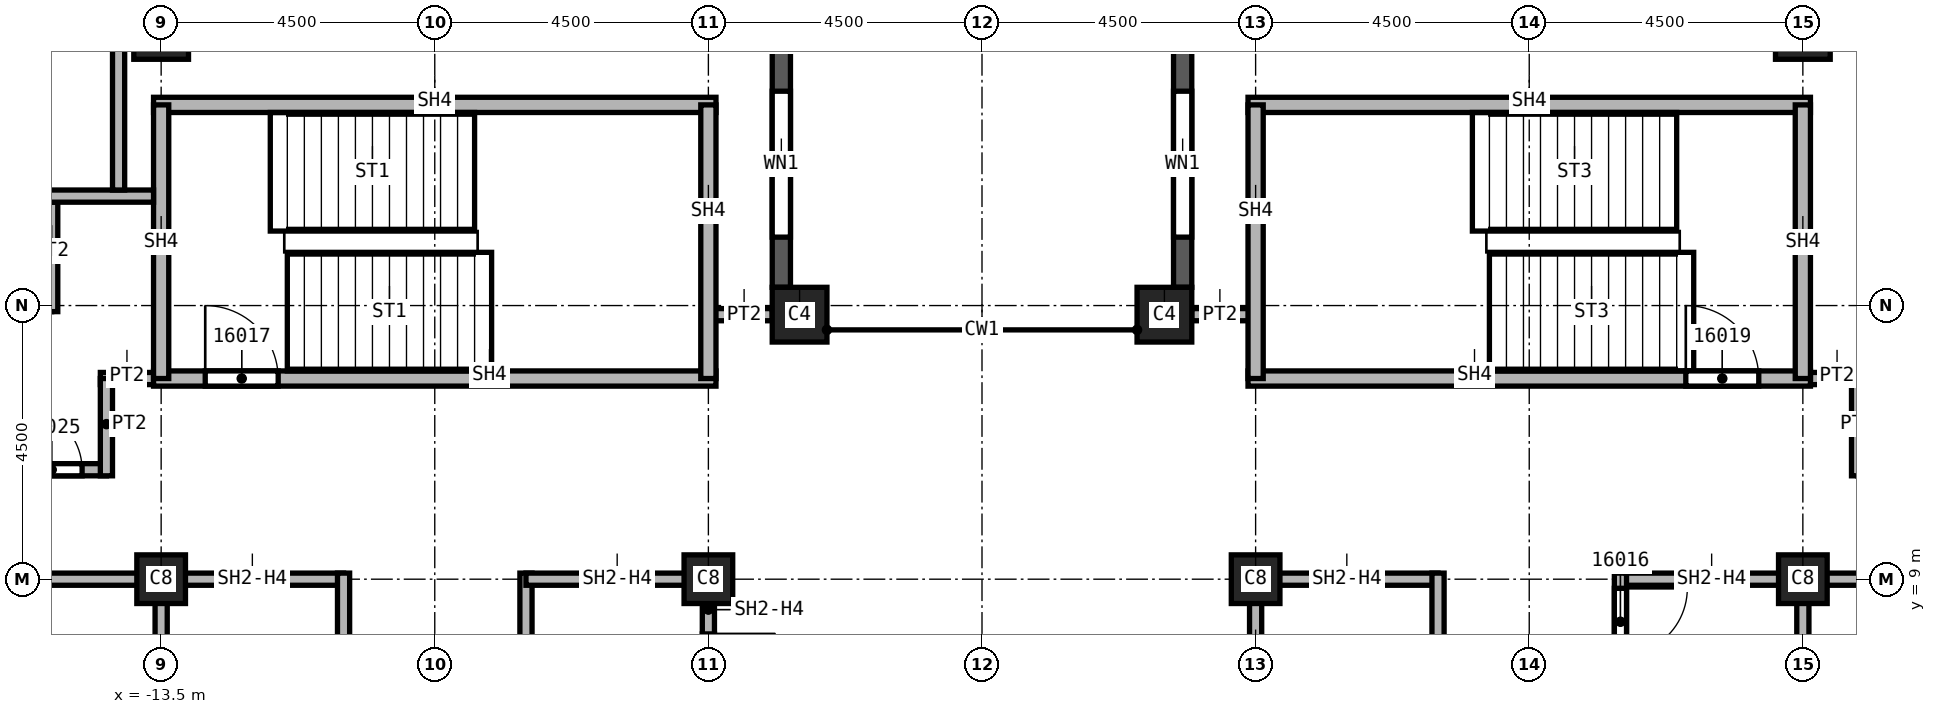
"""IFC4 building model, lengths in metres.
Left out: names, types, materials, properties, quantities, classifications, styles, units other than length and angle.
Written with IfcOpenShell. Run it as: python <this file> out.ifc"""

import sys

from ifc_helpers import new_model, si_unit, direction, frame, frame_2d, origin, origin_2d, place, context, subcontext, project, spatial, rectangle, extrude, element, fill, save


model = new_model("IFC4")
c1 = context("Model", 3, precision=1e-05, world=origin(), true_north=direction((0.0, 1.0)))
c2 = subcontext(c1, "Body", "Model", "MODEL_VIEW")
j1 = project(units=[si_unit("LENGTHUNIT", "METRE"), si_unit("PLANEANGLEUNIT", "RADIAN")], contexts=[c1])
p1 = place(None, origin())
s1 = spatial("IfcSite", under=j1, at=p1, CompositionType="ELEMENT")
p2 = place(p1, origin())
s2 = spatial("IfcBuilding", under=s1, at=p2, CompositionType="ELEMENT")
p3 = place(p2, frame((0.0, 0.0, 246.0)))
s3 = spatial("IfcBuildingStorey", under=s2, at=p3, CompositionType="ELEMENT", Elevation=246.0)
for number, where, z_axis, x_axis in (
    (1, (13.5, 18.0, 0.0), (0.0, 0.0, 1.0), (1.0, 0.0, 0.0)),
    (2, (-13.5, 18.0, 0.0), (0.0, 0.0, 1.0), (1.0, 0.0, 0.0)),
):
    element("IfcColumn", number, at=place(p3, frame(where, z_axis=z_axis, x_axis=x_axis)), inside=s3, PredefinedType="COLUMN", context=c2, shape_type="SweptSolid", body=[
        extrude(rectangle(XDim=0.9, YDim=0.9, at=origin_2d()), origin(), (0.0, 0.0, 1.0), 3.72),
    ])
for number, where, z_axis, x_axis in (
    (3, (4.5, 9.0, 0.0), (0.0, 0.0, 1.0), (1.0, 0.0, 0.0)),
    (4, (13.5, 9.0, 0.0), (0.0, 0.0, 1.0), (1.0, 0.0, 0.0)),
    (5, (-4.5, 9.0, 0.0), (0.0, 0.0, 1.0), (1.0, 0.0, 0.0)),
    (6, (-13.5, 9.0, 0.0), (0.0, 0.0, 1.0), (1.0, 0.0, 0.0)),
):
    element("IfcColumn", number, at=place(p3, frame(where, z_axis=z_axis, x_axis=x_axis)), inside=s3, PredefinedType="COLUMN", context=c2, shape_type="SweptSolid", body=[
        extrude(rectangle(XDim=0.8, YDim=0.8, at=origin_2d()), origin(), (0.0, 0.0, 1.0), 3.72),
    ])
for number, where, z_axis, x_axis in (
    (7, (3.0, 13.35, 0.0), (0.0, 0.0, 1.0), (1.0, 0.0, 0.0)),
    (8, (-3.0, 13.35, 0.0), (0.0, 0.0, 1.0), (1.0, 0.0, 0.0)),
):
    element("IfcColumn", number, at=place(p3, frame(where, z_axis=z_axis, x_axis=x_axis)), inside=s3, PredefinedType="COLUMN", context=c2, shape_type="SweptSolid", body=[
        extrude(rectangle(XDim=0.9, YDim=0.9, at=origin_2d()), origin(), (0.0, 0.0, 1.0), 3.72),
    ])
p4 = place(p3, frame((3.3, 21.9, 0.0), z_axis=(0.0, 0.0, 1.0), x_axis=(0.0, -1.0, 0.0)))
e9 = element("IfcWall", 9, at=p4, inside=s3, PredefinedType="SOLIDWALL", context=c2, shape_type="SweptSolid", body=[
    extrude(rectangle(XDim=8.1, YDim=0.3, at=frame_2d((4.05, 0.0))), origin(), (0.0, 0.0, 1.0), 3.12),
])
p5 = place(p4, frame((0.825, 0.0, 0.8)))
e10 = element("IfcOpeningElement", 10, at=p5, cuts=e9, PredefinedType="OPENING", context=c2, shape_type="SweptSolid", body=[
    extrude(rectangle(XDim=2.4, YDim=1.95, at=frame_2d((1.2, 0.975))), frame((0.0, 0.15, 0.0), z_axis=(0.0, -1.0, 0.0), x_axis=(1.0, 0.0, 0.0)), (0.0, 0.0, 1.0), 0.3),
])
p6 = place(p4, frame((4.875, 0.0, 0.8)))
e11 = element("IfcOpeningElement", 11, at=p6, cuts=e9, PredefinedType="OPENING", context=c2, shape_type="SweptSolid", body=[
    extrude(rectangle(XDim=2.4, YDim=1.95, at=frame_2d((1.2, 0.975))), frame((0.0, 0.15, 0.0), z_axis=(0.0, -1.0, 0.0), x_axis=(1.0, 0.0, 0.0)), (0.0, 0.0, 1.0), 0.3),
])
p7 = place(p3, frame((-3.3, 13.8, 0.0), z_axis=(0.0, 0.0, 1.0), x_axis=(0.0, 1.0, 0.0)))
e12 = element("IfcWall", 12, at=p7, inside=s3, PredefinedType="SOLIDWALL", context=c2, shape_type="SweptSolid", body=[
    extrude(rectangle(XDim=8.1, YDim=0.3, at=frame_2d((4.05, 0.0))), origin(), (0.0, 0.0, 1.0), 3.12),
])
p8 = place(p7, frame((0.825, 0.0, 0.8)))
e13 = element("IfcOpeningElement", 13, at=p8, cuts=e12, PredefinedType="OPENING", context=c2, shape_type="SweptSolid", body=[
    extrude(rectangle(XDim=2.4, YDim=1.95, at=frame_2d((1.2, 0.975))), frame((0.0, 0.15, 0.0), z_axis=(0.0, -1.0, 0.0), x_axis=(1.0, 0.0, 0.0)), (0.0, 0.0, 1.0), 0.3),
])
p9 = place(p7, frame((4.875, 0.0, 0.8)))
e14 = element("IfcOpeningElement", 14, at=p9, cuts=e12, PredefinedType="OPENING", context=c2, shape_type="SweptSolid", body=[
    extrude(rectangle(XDim=2.4, YDim=1.95, at=frame_2d((1.2, 0.975))), frame((0.0, 0.15, 0.0), z_axis=(0.0, -1.0, 0.0), x_axis=(1.0, 0.0, 0.0)), (0.0, 0.0, 1.0), 0.3),
])
p10 = place(p3, frame((-18.0, 10.8, 0.0), z_axis=(0.0, 0.0, 1.0), x_axis=(1.0, 0.0, 0.0)))
e15 = element("IfcWall", 15, at=p10, inside=s3, PredefinedType="PARTITIONING", context=c2, shape_type="SweptSolid", body=[
    extrude(rectangle(XDim=3.6, YDim=0.2, at=frame_2d((1.8, 0.0))), origin(), (0.0, 0.0, 1.0), 3.72),
])
p11 = place(p10, frame((2.2, 0.0, 0.0)))
e16 = element("IfcOpeningElement", 16, at=p11, cuts=e15, PredefinedType="OPENING", context=c2, shape_type="SweptSolid", body=[
    extrude(rectangle(XDim=1.0, YDim=2.1, at=frame_2d((0.5, 1.05))), frame((0.0, 0.1, 0.0), z_axis=(0.0, -1.0, 0.0), x_axis=(1.0, 0.0, 0.0)), (0.0, 0.0, 1.0), 0.2),
])
p12 = place(p3, frame((-15.3, 15.2, 0.0), z_axis=(0.0, 0.0, 1.0), x_axis=(0.0, -1.0, 0.0)))
e17 = element("IfcWall", 17, at=p12, inside=s3, PredefinedType="PARTITIONING", context=c2, shape_type="SweptSolid", body=[
    extrude(rectangle(XDim=1.8, YDim=0.2, at=frame_2d((0.9, 0.0))), origin(), (0.0, 0.0, 1.0), 3.72),
])
p13 = place(p3, frame((-14.5, 12.3, 0.0), z_axis=(0.0, 0.0, 1.0), x_axis=(1.0, 0.0, 0.0)))
e18 = element("IfcWall", 18, at=p13, inside=s3, PredefinedType="PARTITIONING", context=c2, shape_type="SweptSolid", body=[
    extrude(rectangle(XDim=1.125, YDim=0.2, at=frame_2d((0.562, 0.0))), origin(), (0.0, 0.0, 1.0), 3.72),
])
p14 = place(p3, frame((-13.5, 9.0, 0.0), z_axis=(0.0, 0.0, 1.0), x_axis=(-1.0, 0.0, 0.0)))
e19 = element("IfcWall", 19, at=p14, inside=s3, PredefinedType="PARTITIONING", context=c2, shape_type="SweptSolid", body=[
    extrude(rectangle(XDim=4.5, YDim=0.2, at=frame_2d((2.25, 0.0))), origin(), (0.0, 0.0, 1.0), 3.72),
])
p15 = place(p3, frame((-14.4, 10.7, 0.0), z_axis=(0.0, 0.0, 1.0), x_axis=(0.0, 1.0, 0.0)))
e20 = element("IfcWall", 20, at=p15, inside=s3, PredefinedType="PARTITIONING", context=c2, shape_type="SweptSolid", body=[
    extrude(rectangle(XDim=1.6, YDim=0.2, at=frame_2d((0.8, 0.0))), origin(), (0.0, 0.0, 1.0), 3.72),
])
for number, where, z_axis, x_axis in (
    (21, (-4.5, 13.35, 0.0), (0.0, 0.0, 1.0), (1.0, 0.0, 0.0)),
    (22, (3.45, 13.35, 0.0), (0.0, 0.0, 1.0), (1.0, 0.0, 0.0)),
):
    element("IfcWall", number, at=place(p3, frame(where, z_axis=z_axis, x_axis=x_axis)), inside=s3, PredefinedType="PARTITIONING", context=c2, shape_type="SweptSolid", body=[
        extrude(rectangle(XDim=1.05, YDim=0.2, at=frame_2d((0.525, 0.0))), origin(), (0.0, 0.0, 1.0), 3.72),
    ])
p16 = place(p3, frame((13.375, 12.3, 0.0), z_axis=(0.0, 0.0, 1.0), x_axis=(1.0, 0.0, 0.0)))
e23 = element("IfcWall", 23, at=p16, inside=s3, PredefinedType="PARTITIONING", context=c2, shape_type="SweptSolid", body=[
    extrude(rectangle(XDim=1.125, YDim=0.2, at=frame_2d((0.562, 0.0))), origin(), (0.0, 0.0, 1.0), 3.72),
])
p17 = place(p3, frame((18.0, 9.0, 0.0), z_axis=(0.0, 0.0, 1.0), x_axis=(-1.0, 0.0, 0.0)))
e24 = element("IfcWall", 24, at=p17, inside=s3, PredefinedType="PARTITIONING", context=c2, shape_type="SweptSolid", body=[
    extrude(rectangle(XDim=4.5, YDim=0.2, at=frame_2d((2.25, 0.0))), origin(), (0.0, 0.0, 1.0), 3.72),
])
p18 = place(p3, frame((14.4, 12.3, 0.0), z_axis=(0.0, 0.0, 1.0), x_axis=(0.0, -1.0, 0.0)))
e25 = element("IfcWall", 25, at=p18, inside=s3, PredefinedType="PARTITIONING", context=c2, shape_type="SweptSolid", body=[
    extrude(rectangle(XDim=1.6, YDim=0.2, at=frame_2d((0.8, 0.0))), origin(), (0.0, 0.0, 1.0), 3.72),
])
p19 = place(p3, frame((-13.6, 9.0, 0.0), z_axis=(0.0, 0.0, 1.0), x_axis=(1.0, 0.0, 0.0)))
e26 = element("IfcWall", 26, at=p19, inside=s3, PredefinedType="SOLIDWALL", context=c2, shape_type="SweptSolid", body=[
    extrude(rectangle(XDim=3.1, YDim=0.2, at=frame_2d((1.55, 0.0))), origin(), (0.0, 0.0, 1.0), 3.042),
])
p20 = place(p3, frame((-13.5, 5.0, 0.0), z_axis=(0.0, 0.0, 1.0), x_axis=(0.0, 1.0, 0.0)))
e27 = element("IfcWall", 27, at=p20, inside=s3, PredefinedType="SOLIDWALL", context=c2, shape_type="SweptSolid", body=[
    extrude(rectangle(XDim=4.1, YDim=0.2, at=frame_2d((2.05, 0.0))), origin(), (0.0, 0.0, 1.0), 3.042),
])
p21 = place(p3, frame((-10.5, 4.925, 0.0), z_axis=(0.0, 0.0, 1.0), x_axis=(0.0, 1.0, 0.0)))
e28 = element("IfcWall", 28, at=p21, inside=s3, PredefinedType="SOLIDWALL", context=c2, shape_type="SweptSolid", body=[
    extrude(rectangle(XDim=4.175, YDim=0.2, at=frame_2d((2.087, 0.0))), origin(), (0.0, 0.0, 1.0), 3.72),
])
p22 = place(p21, frame((0.25, 0.0, 0.0)))
e29 = element("IfcOpeningElement", 29, at=p22, cuts=e28, PredefinedType="OPENING", context=c2, shape_type="SweptSolid", body=[
    extrude(rectangle(XDim=1.1, YDim=2.1, at=frame_2d((0.55, 1.05))), frame((0.0, 0.1, 0.0), z_axis=(0.0, -1.0, 0.0), x_axis=(1.0, 0.0, 0.0)), (0.0, 0.0, 1.0), 0.2),
])
p23 = place(p3, frame((-7.5, 6.0, 0.0), z_axis=(0.0, 0.0, 1.0), x_axis=(0.0, 1.0, 0.0)))
e30 = element("IfcWall", 30, at=p23, inside=s3, PredefinedType="SOLIDWALL", context=c2, shape_type="SweptSolid", body=[
    extrude(rectangle(XDim=3.1, YDim=0.2, at=frame_2d((1.55, 0.0))), origin(), (0.0, 0.0, 1.0), 3.72),
])
p24 = place(p3, frame((-7.5, 9.0, 0.0), z_axis=(0.0, 0.0, 1.0), x_axis=(1.0, 0.0, 0.0)))
e31 = element("IfcWall", 31, at=p24, inside=s3, PredefinedType="SOLIDWALL", context=c2, shape_type="SweptSolid", body=[
    extrude(rectangle(XDim=3.0, YDim=0.2, at=frame_2d((1.5, 0.0))), origin(), (0.0, 0.0, 1.0), 3.042),
])
p25 = place(p3, frame((-4.5, 9.1, 0.0), z_axis=(0.0, 0.0, 1.0), x_axis=(0.0, -1.0, 0.0)))
e32 = element("IfcWall", 32, at=p25, inside=s3, PredefinedType="SOLIDWALL", context=c2, shape_type="SweptSolid", body=[
    extrude(rectangle(XDim=3.1, YDim=0.2, at=frame_2d((1.55, 0.0))), origin(), (0.0, 0.0, 1.0), 3.042),
])
p26 = place(p25, frame((1.0, 0.0, 0.0)))
e33 = element("IfcOpeningElement", 33, at=p26, cuts=e32, PredefinedType="OPENING", context=c2, shape_type="SweptSolid", body=[
    extrude(rectangle(XDim=1.1, YDim=2.1, at=frame_2d((0.55, 1.05))), frame((0.0, 0.1, 0.0), z_axis=(0.0, -1.0, 0.0), x_axis=(1.0, 0.0, 0.0)), (0.0, 0.0, 1.0), 0.2),
])
p27 = place(p3, frame((4.5, 0.0, 0.0), z_axis=(0.0, 0.0, 1.0), x_axis=(0.0, 1.0, 0.0)))
e34 = element("IfcWall", 34, at=p27, inside=s3, PredefinedType="SOLIDWALL", context=c2, shape_type="SweptSolid", body=[
    extrude(rectangle(XDim=9.1, YDim=0.2, at=frame_2d((4.55, 0.0))), origin(), (0.0, 0.0, 1.0), 3.042),
])
p28 = place(p27, frame((1.6, 0.0, 0.0)))
e35 = element("IfcOpeningElement", 35, at=p28, cuts=e34, PredefinedType="OPENING", context=c2, shape_type="SweptSolid", body=[
    extrude(rectangle(XDim=1.1, YDim=2.1, at=frame_2d((0.55, 1.05))), frame((0.0, 0.1, 0.0), z_axis=(0.0, -1.0, 0.0), x_axis=(1.0, 0.0, 0.0)), (0.0, 0.0, 1.0), 0.2),
])
p29 = place(p27, frame((5.5, 0.0, 0.0)))
e36 = element("IfcOpeningElement", 36, at=p29, cuts=e34, PredefinedType="OPENING", context=c2, shape_type="SweptSolid", body=[
    extrude(rectangle(XDim=1.1, YDim=2.1, at=frame_2d((0.55, 1.05))), frame((0.0, 0.1, 0.0), z_axis=(0.0, -1.0, 0.0), x_axis=(1.0, 0.0, 0.0)), (0.0, 0.0, 1.0), 0.2),
])
p30 = place(p3, frame((4.5, 9.0, 0.0), z_axis=(0.0, 0.0, 1.0), x_axis=(1.0, 0.0, 0.0)))
e37 = element("IfcWall", 37, at=p30, inside=s3, PredefinedType="SOLIDWALL", context=c2, shape_type="SweptSolid", body=[
    extrude(rectangle(XDim=3.0, YDim=0.2, at=frame_2d((1.5, 0.0))), origin(), (0.0, 0.0, 1.0), 3.042),
])
p31 = place(p3, frame((7.5, 9.1, 0.0), z_axis=(0.0, 0.0, 1.0), x_axis=(0.0, -1.0, 0.0)))
e38 = element("IfcWall", 38, at=p31, inside=s3, PredefinedType="SOLIDWALL", context=c2, shape_type="SweptSolid", body=[
    extrude(rectangle(XDim=6.225, YDim=0.2, at=frame_2d((3.113, 0.0))), origin(), (0.0, 0.0, 1.0), 3.72),
])
p32 = place(p3, frame((10.5, 9.0, 0.0), z_axis=(0.0, 0.0, 1.0), x_axis=(1.0, 0.0, 0.0)))
e39 = element("IfcWall", 39, at=p32, inside=s3, PredefinedType="SOLIDWALL", context=c2, shape_type="SweptSolid", body=[
    extrude(rectangle(XDim=3.1, YDim=0.2, at=frame_2d((1.55, 0.0))), origin(), (0.0, 0.0, 1.0), 3.042),
])
p33 = place(p3, frame((10.5, 9.1, 0.0), z_axis=(0.0, 0.0, 1.0), x_axis=(0.0, -1.0, 0.0)))
e40 = element("IfcWall", 40, at=p33, inside=s3, PredefinedType="SOLIDWALL", context=c2, shape_type="SweptSolid", body=[
    extrude(rectangle(XDim=3.225, YDim=0.2, at=frame_2d((1.613, 0.0))), origin(), (0.0, 0.0, 1.0), 3.72),
])
p34 = place(p33, frame((0.25, 0.0, 0.0)))
e41 = element("IfcOpeningElement", 41, at=p34, cuts=e40, PredefinedType="OPENING", context=c2, shape_type="SweptSolid", body=[
    extrude(rectangle(XDim=1.1, YDim=2.1, at=frame_2d((0.55, 1.05))), frame((0.0, 0.1, 0.0), z_axis=(0.0, -1.0, 0.0), x_axis=(1.0, 0.0, 0.0)), (0.0, 0.0, 1.0), 0.2),
])
p35 = place(p3, frame((13.5, 9.1, 0.0), z_axis=(0.0, 0.0, 1.0), x_axis=(0.0, -1.0, 0.0)))
e42 = element("IfcWall", 42, at=p35, inside=s3, PredefinedType="SOLIDWALL", context=c2, shape_type="SweptSolid", body=[
    extrude(rectangle(XDim=3.1, YDim=0.2, at=frame_2d((1.55, 0.0))), origin(), (0.0, 0.0, 1.0), 3.042),
])
p36 = place(p3, frame((-13.625, 12.3, 0.0), z_axis=(0.0, 0.0, 1.0), x_axis=(1.0, 0.0, 0.0)))
e43 = element("IfcWall", 43, at=p36, inside=s3, PredefinedType="SOLIDWALL", context=c2, shape_type="SweptSolid", body=[
    extrude(rectangle(XDim=9.25, YDim=0.25, at=frame_2d((4.625, 0.0))), origin(), (0.0, 0.0, 1.0), 3.72),
])
p37 = place(p36, frame((0.85, 0.0, 0.0)))
e44 = element("IfcOpeningElement", 44, at=p37, cuts=e43, PredefinedType="OPENING", context=c2, shape_type="SweptSolid", body=[
    extrude(rectangle(XDim=1.2, YDim=2.1, at=frame_2d((0.6, 1.05))), frame((0.0, 0.125, 0.0), z_axis=(0.0, -1.0, 0.0), x_axis=(1.0, 0.0, 0.0)), (0.0, 0.0, 1.0), 0.25),
])
p38 = place(p3, frame((-13.625, 16.8, 0.0), z_axis=(0.0, 0.0, 1.0), x_axis=(1.0, 0.0, 0.0)))
e45 = element("IfcWall", 45, at=p38, inside=s3, PredefinedType="SOLIDWALL", context=c2, shape_type="SweptSolid", body=[
    extrude(rectangle(XDim=9.25, YDim=0.25, at=frame_2d((4.625, 0.0))), origin(), (0.0, 0.0, 1.0), 3.72),
])
for number, where, z_axis, x_axis in (
    (46, (-13.5, 12.3, 0.0), (0.0, 0.0, 1.0), (0.0, 1.0, 0.0)),
    (47, (-4.5, 16.8, 0.0), (0.0, 0.0, 1.0), (0.0, -1.0, 0.0)),
):
    element("IfcWall", number, at=place(p3, frame(where, z_axis=z_axis, x_axis=x_axis)), inside=s3, PredefinedType="SOLIDWALL", context=c2, shape_type="SweptSolid", body=[
        extrude(rectangle(XDim=4.5, YDim=0.25, at=frame_2d((2.25, 0.0))), origin(), (0.0, 0.0, 1.0), 3.72),
    ])
p39 = place(p3, frame((4.375, 12.3, 0.0), z_axis=(0.0, 0.0, 1.0), x_axis=(1.0, 0.0, 0.0)))
e48 = element("IfcWall", 48, at=p39, inside=s3, PredefinedType="SOLIDWALL", context=c2, shape_type="SweptSolid", body=[
    extrude(rectangle(XDim=9.25, YDim=0.25, at=frame_2d((4.625, 0.0))), origin(), (0.0, 0.0, 1.0), 3.72),
])
p40 = place(p39, frame((7.2, 0.0, 0.0)))
e49 = element("IfcOpeningElement", 49, at=p40, cuts=e48, PredefinedType="OPENING", context=c2, shape_type="SweptSolid", body=[
    extrude(rectangle(XDim=1.2, YDim=2.1, at=frame_2d((0.6, 1.05))), frame((0.0, 0.125, 0.0), z_axis=(0.0, -1.0, 0.0), x_axis=(1.0, 0.0, 0.0)), (0.0, 0.0, 1.0), 0.25),
])
p41 = place(p3, frame((4.375, 16.8, 0.0), z_axis=(0.0, 0.0, 1.0), x_axis=(1.0, 0.0, 0.0)))
e50 = element("IfcWall", 50, at=p41, inside=s3, PredefinedType="SOLIDWALL", context=c2, shape_type="SweptSolid", body=[
    extrude(rectangle(XDim=9.25, YDim=0.25, at=frame_2d((4.625, 0.0))), origin(), (0.0, 0.0, 1.0), 3.72),
])
for number, where, z_axis, x_axis in (
    (51, (4.5, 12.3, 0.0), (0.0, 0.0, 1.0), (0.0, 1.0, 0.0)),
    (52, (13.5, 16.8, 0.0), (0.0, 0.0, 1.0), (0.0, -1.0, 0.0)),
):
    element("IfcWall", number, at=place(p3, frame(where, z_axis=z_axis, x_axis=x_axis)), inside=s3, PredefinedType="SOLIDWALL", context=c2, shape_type="SweptSolid", body=[
        extrude(rectangle(XDim=4.5, YDim=0.25, at=frame_2d((2.25, 0.0))), origin(), (0.0, 0.0, 1.0), 3.72),
    ])
p42 = place(p3, frame((-21.9, 15.3, 0.0), z_axis=(0.0, 0.0, 1.0), x_axis=(1.0, 0.0, 0.0)))
e53 = element("IfcWall", 53, at=p42, inside=s3, PredefinedType="SOLIDWALL", context=c2, shape_type="SweptSolid", body=[
    extrude(rectangle(XDim=8.275, YDim=0.2, at=frame_2d((4.137, 0.0))), origin(), (0.0, 0.0, 1.0), 3.72),
])
p43 = place(p42, frame((4.8, 0.0, 0.0)))
e54 = element("IfcOpeningElement", 54, at=p43, cuts=e53, PredefinedType="OPENING", context=c2, shape_type="SweptSolid", body=[
    extrude(rectangle(XDim=1.2, YDim=2.1, at=frame_2d((0.6, 1.05))), frame((0.0, 0.1, 0.0), z_axis=(0.0, -1.0, 0.0), x_axis=(1.0, 0.0, 0.0)), (0.0, 0.0, 1.0), 0.2),
])
p44 = place(p3, frame((-14.2, 15.4, 0.0), z_axis=(0.0, 0.0, 1.0), x_axis=(0.0, 1.0, 0.0)))
e55 = element("IfcWall", 55, at=p44, inside=s3, PredefinedType="SOLIDWALL", context=c2, shape_type="SweptSolid", body=[
    extrude(rectangle(XDim=5.9, YDim=0.2, at=frame_2d((2.95, 0.0))), origin(), (0.0, 0.0, 1.0), 3.72),
])
p45 = place(p6, origin())
e56 = element("IfcWindow", 56, at=p45, inside=s3, PartitioningType="SINGLE_PANEL", PredefinedType="WINDOW", context=c2, shape_type="SweptSolid", body=[
    extrude(rectangle(XDim=2.4, YDim=1.95, at=frame_2d((1.2, 0.975))), frame((0.0, 0.03, 0.0), z_axis=(0.0, -1.0, 0.0), x_axis=(1.0, 0.0, 0.0)), (0.0, 0.0, 1.0), 0.06),
])
fill(e11, e56)
p46 = place(p8, origin())
e57 = element("IfcWindow", 57, at=p46, inside=s3, PartitioningType="SINGLE_PANEL", PredefinedType="WINDOW", context=c2, shape_type="SweptSolid", body=[
    extrude(rectangle(XDim=2.4, YDim=1.95, at=frame_2d((1.2, 0.975))), frame((0.0, 0.03, 0.0), z_axis=(0.0, -1.0, 0.0), x_axis=(1.0, 0.0, 0.0)), (0.0, 0.0, 1.0), 0.06),
])
fill(e13, e57)
p47 = place(p34, origin())
e58 = element("IfcDoor", 58, at=p47, inside=s3, OperationType="SINGLE_SWING_LEFT", PredefinedType="DOOR", context=c2, shape_type="SweptSolid", body=[
    extrude(rectangle(XDim=1.1, YDim=2.1, at=frame_2d((0.55, 1.05))), frame((0.0, 0.025, 0.0), z_axis=(0.0, -1.0, 0.0), x_axis=(1.0, 0.0, 0.0)), (0.0, 0.0, 1.0), 0.05),
])
fill(e41, e58)
p48 = place(p37, origin())
e59 = element("IfcDoor", 59, at=p48, inside=s3, OperationType="SINGLE_SWING_RIGHT", PredefinedType="DOOR", context=c2, shape_type="SweptSolid", body=[
    extrude(rectangle(XDim=1.2, YDim=2.1, at=frame_2d((0.6, 1.05))), frame((0.0, 0.025, 0.0), z_axis=(0.0, -1.0, 0.0), x_axis=(1.0, 0.0, 0.0)), (0.0, 0.0, 1.0), 0.05),
])
fill(e44, e59)
p49 = place(p40, origin())
e60 = element("IfcDoor", 60, at=p49, inside=s3, OperationType="SINGLE_SWING_RIGHT", PredefinedType="DOOR", context=c2, shape_type="SweptSolid", body=[
    extrude(rectangle(XDim=1.2, YDim=2.1, at=frame_2d((0.6, 1.05))), frame((0.0, 0.025, 0.0), z_axis=(0.0, -1.0, 0.0), x_axis=(1.0, 0.0, 0.0)), (0.0, 0.0, 1.0), 0.05),
])
fill(e49, e60)
p50 = place(p11, origin())
e61 = element("IfcDoor", 61, at=p50, inside=s3, OperationType="SINGLE_SWING_RIGHT", PredefinedType="DOOR", context=c2, shape_type="SweptSolid", body=[
    extrude(rectangle(XDim=1.0, YDim=2.1, at=frame_2d((0.5, 1.05))), frame((0.0, 0.025, 0.0), z_axis=(0.0, -1.0, 0.0), x_axis=(1.0, 0.0, 0.0)), (0.0, 0.0, 1.0), 0.05),
])
fill(e16, e61)
save(model, sys.argv[1])
